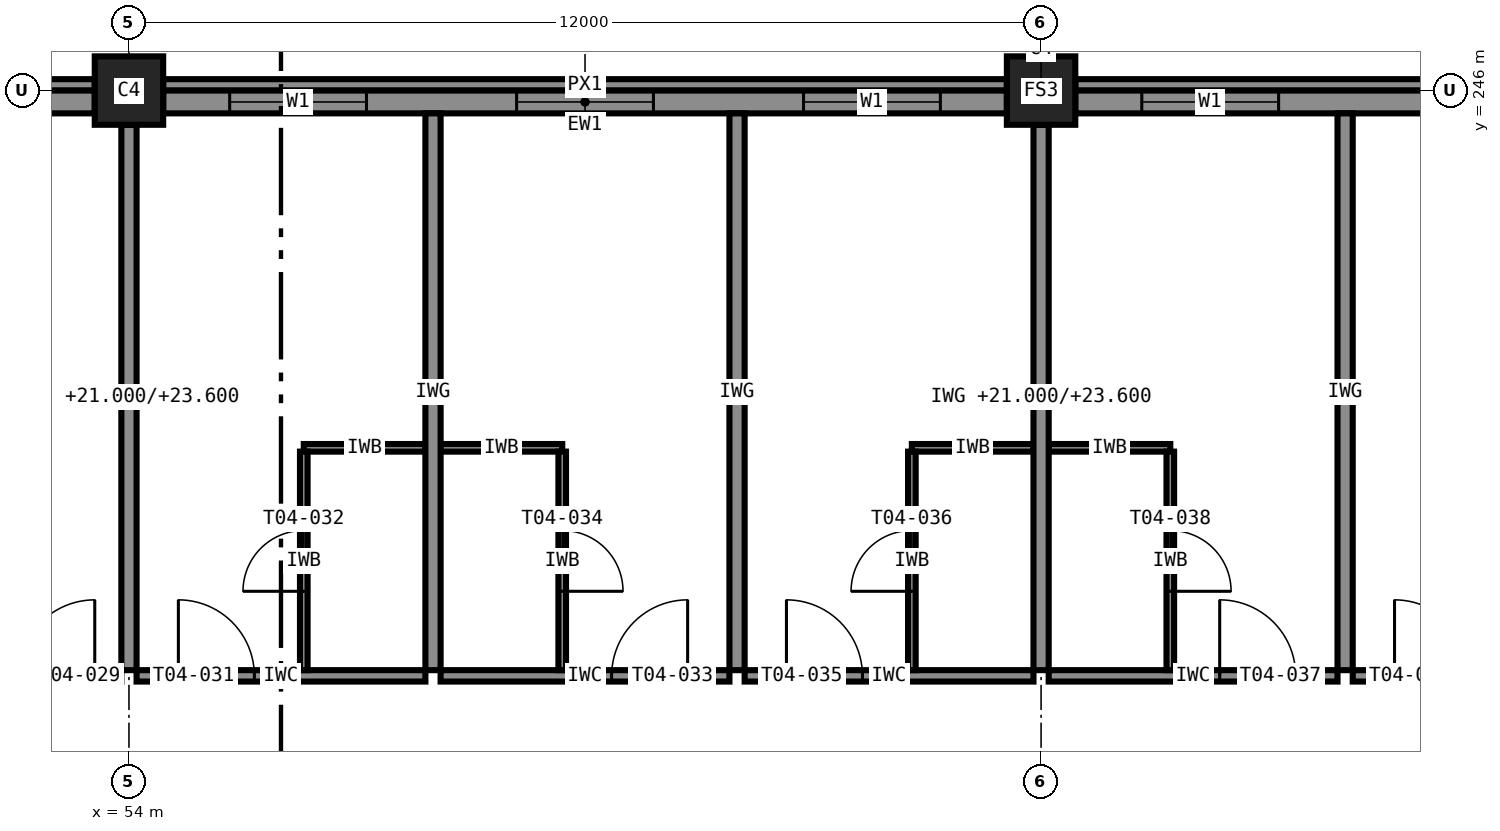
"""IFC4 building model, lengths in metres.
Left out: names, types, materials, properties, quantities, classifications, styles, units other than length and angle.
Written with IfcOpenShell. Run it as: python <this file> out.ifc"""

import sys

from ifc_helpers import new_model, si_unit, direction, frame, frame_2d, origin, origin_2d, place, context, subcontext, project, spatial, rectangle, extrude, element, fill, save


model = new_model("IFC4")
c1 = context("Model", 3, precision=1e-05, world=origin(), true_north=direction((0.0, 1.0)))
c2 = subcontext(c1, "Body", "Model", "MODEL_VIEW")
j1 = project(units=[si_unit("LENGTHUNIT", "METRE"), si_unit("PLANEANGLEUNIT", "RADIAN")], contexts=[c1])
p1 = place(None, origin())
s1 = spatial("IfcSite", under=j1, at=p1, CompositionType="ELEMENT")
p2 = place(p1, origin())
s2 = spatial("IfcBuilding", under=s1, at=p2, CompositionType="ELEMENT")
p3 = place(p2, frame((0.0, 0.0, 21.0)))
s3 = spatial("IfcBuildingStorey", under=s2, at=p3, CompositionType="ELEMENT", Elevation=21.0)
for number, where, z_axis, x_axis in (
    (1, (54.0, 246.0, 0.0), (0.0, 0.0, 1.0), (1.0, 0.0, 0.0)),
    (2, (66.0, 246.0, 0.0), (0.0, 0.0, 1.0), (1.0, 0.0, 0.0)),
):
    element("IfcColumn", number, at=place(p3, frame(where, z_axis=z_axis, x_axis=x_axis)), inside=s3, PredefinedType="COLUMN", context=c2, shape_type="SweptSolid", body=[
        extrude(rectangle(XDim=0.9, YDim=0.9, at=origin_2d()), origin(), (0.0, 0.0, 1.0), 3.6),
    ])
p4 = place(p3, frame((77.55, 245.85, 0.0), z_axis=(0.0, 0.0, 1.0), x_axis=(-1.0, 0.0, 0.0)))
e3 = element("IfcWall", 3, at=p4, inside=s3, PredefinedType="STANDARD", context=c2, shape_type="SweptSolid", body=[
    extrude(rectangle(XDim=11.1, YDim=0.3, at=frame_2d((5.55, 0.0))), origin(), (0.0, 0.0, 1.0), 2.6),
])
p5 = place(p4, frame((8.425, 0.0, 0.85)))
e4 = element("IfcOpeningElement", 4, at=p5, cuts=e3, PredefinedType="OPENING", context=c2, shape_type="SweptSolid", body=[
    extrude(rectangle(XDim=1.8, YDim=1.75, at=frame_2d((0.9, 0.875))), frame((0.0, 0.16, 0.0), z_axis=(0.0, -1.0, 0.0), x_axis=(1.0, 0.0, 0.0)), (0.0, 0.0, 1.0), 0.32),
])
p6 = place(p4, frame((4.65, 0.0, 0.85)))
e5 = element("IfcOpeningElement", 5, at=p6, cuts=e3, PredefinedType="OPENING", context=c2, shape_type="SweptSolid", body=[
    extrude(rectangle(XDim=1.8, YDim=1.75, at=frame_2d((0.9, 0.875))), frame((0.0, 0.16, 0.0), z_axis=(0.0, -1.0, 0.0), x_axis=(1.0, 0.0, 0.0)), (0.0, 0.0, 1.0), 0.32),
])
p7 = place(p4, frame((0.875, 0.0, 0.85)))
e6 = element("IfcOpeningElement", 6, at=p7, cuts=e3, PredefinedType="OPENING", context=c2, shape_type="SweptSolid", body=[
    extrude(rectangle(XDim=1.8, YDim=1.75, at=frame_2d((0.9, 0.875))), frame((0.0, 0.16, 0.0), z_axis=(0.0, -1.0, 0.0), x_axis=(1.0, 0.0, 0.0)), (0.0, 0.0, 1.0), 0.32),
])
p8 = place(p3, frame((65.55, 245.85, 0.0), z_axis=(0.0, 0.0, 1.0), x_axis=(-1.0, 0.0, 0.0)))
e7 = element("IfcWall", 7, at=p8, inside=s3, PredefinedType="STANDARD", context=c2, shape_type="SweptSolid", body=[
    extrude(rectangle(XDim=11.1, YDim=0.3, at=frame_2d((5.55, 0.0))), origin(), (0.0, 0.0, 1.0), 2.6),
])
p9 = place(p8, frame((8.425, 0.0, 0.85)))
e8 = element("IfcOpeningElement", 8, at=p9, cuts=e7, PredefinedType="OPENING", context=c2, shape_type="SweptSolid", body=[
    extrude(rectangle(XDim=1.8, YDim=1.75, at=frame_2d((0.9, 0.875))), frame((0.0, 0.16, 0.0), z_axis=(0.0, -1.0, 0.0), x_axis=(1.0, 0.0, 0.0)), (0.0, 0.0, 1.0), 0.32),
])
p10 = place(p8, frame((4.65, 0.0, 0.85)))
e9 = element("IfcOpeningElement", 9, at=p10, cuts=e7, PredefinedType="OPENING", context=c2, shape_type="SweptSolid", body=[
    extrude(rectangle(XDim=1.8, YDim=1.75, at=frame_2d((0.9, 0.875))), frame((0.0, 0.16, 0.0), z_axis=(0.0, -1.0, 0.0), x_axis=(1.0, 0.0, 0.0)), (0.0, 0.0, 1.0), 0.32),
])
p11 = place(p8, frame((0.875, 0.0, 0.85)))
e10 = element("IfcOpeningElement", 10, at=p11, cuts=e7, PredefinedType="OPENING", context=c2, shape_type="SweptSolid", body=[
    extrude(rectangle(XDim=1.8, YDim=1.75, at=frame_2d((0.9, 0.875))), frame((0.0, 0.16, 0.0), z_axis=(0.0, -1.0, 0.0), x_axis=(1.0, 0.0, 0.0)), (0.0, 0.0, 1.0), 0.32),
])
p12 = place(p3, frame((53.55, 245.85, 0.0), z_axis=(0.0, 0.0, 1.0), x_axis=(-1.0, 0.0, 0.0)))
e11 = element("IfcWall", 11, at=p12, inside=s3, PredefinedType="STANDARD", context=c2, shape_type="SweptSolid", body=[
    extrude(rectangle(XDim=11.1, YDim=0.3, at=frame_2d((5.55, 0.0))), origin(), (0.0, 0.0, 1.0), 2.6),
])
p13 = place(p12, frame((4.45, 0.0, 0.85)))
e12 = element("IfcOpeningElement", 12, at=p13, cuts=e11, PredefinedType="OPENING", context=c2, shape_type="SweptSolid", body=[
    extrude(rectangle(XDim=1.8, YDim=1.75, at=frame_2d((0.9, 0.875))), frame((0.0, 0.16, 0.0), z_axis=(0.0, -1.0, 0.0), x_axis=(1.0, 0.0, 0.0)), (0.0, 0.0, 1.0), 0.32),
])
p14 = place(p12, frame((0.675, 0.0, 0.85)))
e13 = element("IfcOpeningElement", 13, at=p14, cuts=e11, PredefinedType="OPENING", context=c2, shape_type="SweptSolid", body=[
    extrude(rectangle(XDim=1.8, YDim=1.75, at=frame_2d((0.9, 0.875))), frame((0.0, 0.16, 0.0), z_axis=(0.0, -1.0, 0.0), x_axis=(1.0, 0.0, 0.0)), (0.0, 0.0, 1.0), 0.32),
])
for number, where, z_axis, x_axis in (
    (14, (77.55, 246.075, 3.4), (0.0, 0.0, 1.0), (-1.0, 0.0, 0.0)),
    (15, (65.55, 246.075, 3.4), (0.0, 0.0, 1.0), (-1.0, 0.0, 0.0)),
    (16, (53.55, 246.075, 3.4), (0.0, 0.0, 1.0), (-1.0, 0.0, 0.0)),
):
    element("IfcWall", number, at=place(p3, frame(where, z_axis=z_axis, x_axis=x_axis)), inside=s3, PredefinedType="STANDARD", context=c2, shape_type="SweptSolid", body=[
        extrude(rectangle(XDim=11.1, YDim=0.15, at=frame_2d((5.55, 0.0))), origin(), (0.0, 0.0, 1.0), 0.2),
    ])
p15 = place(p3, frame((50.5, 238.3, 0.0), z_axis=(0.0, 0.0, 1.0), x_axis=(1.0, 0.0, 0.0)))
e17 = element("IfcWall", 17, at=p15, inside=s3, PredefinedType="PARTITIONING", context=c2, shape_type="SweptSolid", body=[
    extrude(rectangle(XDim=3.4, YDim=0.15, at=frame_2d((1.7, 0.0))), origin(), (0.0, 0.0, 1.0), 3.4),
])
p16 = place(p15, frame((2.05, 0.0, 0.0)))
e18 = element("IfcOpeningElement", 18, at=p16, cuts=e17, PredefinedType="OPENING", context=c2, shape_type="SweptSolid", body=[
    extrude(rectangle(XDim=1.0, YDim=2.1, at=frame_2d((0.5, 1.05))), frame((0.0, 0.085, 0.0), z_axis=(0.0, -1.0, 0.0), x_axis=(1.0, 0.0, 0.0)), (0.0, 0.0, 1.0), 0.17),
])
p17 = place(p3, frame((54.1, 238.3, 0.0), z_axis=(0.0, 0.0, 1.0), x_axis=(1.0, 0.0, 0.0)))
e19 = element("IfcWall", 19, at=p17, inside=s3, PredefinedType="PARTITIONING", context=c2, shape_type="SweptSolid", body=[
    extrude(rectangle(XDim=3.8, YDim=0.15, at=frame_2d((1.9, 0.0))), origin(), (0.0, 0.0, 1.0), 3.4),
])
p18 = place(p17, frame((0.55, 0.0, 0.0)))
e20 = element("IfcOpeningElement", 20, at=p18, cuts=e19, PredefinedType="OPENING", context=c2, shape_type="SweptSolid", body=[
    extrude(rectangle(XDim=1.0, YDim=2.1, at=frame_2d((0.5, 1.05))), frame((0.0, 0.085, 0.0), z_axis=(0.0, -1.0, 0.0), x_axis=(1.0, 0.0, 0.0)), (0.0, 0.0, 1.0), 0.17),
])
p19 = place(p3, frame((56.3, 241.3, 0.0), z_axis=(0.0, 0.0, 1.0), x_axis=(1.0, 0.0, 0.0)))
e21 = element("IfcWall", 21, at=p19, inside=s3, PredefinedType="PARTITIONING", context=c2, shape_type="SweptSolid", body=[
    extrude(rectangle(XDim=1.6, YDim=0.1, at=frame_2d((0.8, 0.0))), origin(), (0.0, 0.0, 1.0), 3.4),
])
p20 = place(p3, frame((56.3, 238.375, 0.0), z_axis=(0.0, 0.0, 1.0), x_axis=(0.0, 1.0, 0.0)))
e22 = element("IfcWall", 22, at=p20, inside=s3, PredefinedType="PARTITIONING", context=c2, shape_type="SweptSolid", body=[
    extrude(rectangle(XDim=2.875, YDim=0.1, at=frame_2d((1.438, 0.0))), origin(), (0.0, 0.0, 1.0), 3.4),
])
p21 = place(p20, frame((1.038, 0.0, 0.0)))
e23 = element("IfcOpeningElement", 23, at=p21, cuts=e22, PredefinedType="OPENING", context=c2, shape_type="SweptSolid", body=[
    extrude(rectangle(XDim=0.8, YDim=2.1, at=frame_2d((0.4, 1.05))), frame((0.0, 0.06, 0.0), z_axis=(0.0, -1.0, 0.0), x_axis=(1.0, 0.0, 0.0)), (0.0, 0.0, 1.0), 0.12),
])
p22 = place(p3, frame((58.1, 238.3, 0.0), z_axis=(0.0, 0.0, 1.0), x_axis=(1.0, 0.0, 0.0)))
e24 = element("IfcWall", 24, at=p22, inside=s3, PredefinedType="PARTITIONING", context=c2, shape_type="SweptSolid", body=[
    extrude(rectangle(XDim=3.8, YDim=0.15, at=frame_2d((1.9, 0.0))), origin(), (0.0, 0.0, 1.0), 3.4),
])
p23 = place(p22, frame((2.25, 0.0, 0.0)))
e25 = element("IfcOpeningElement", 25, at=p23, cuts=e24, PredefinedType="OPENING", context=c2, shape_type="SweptSolid", body=[
    extrude(rectangle(XDim=1.0, YDim=2.1, at=frame_2d((0.5, 1.05))), frame((0.0, 0.085, 0.0), z_axis=(0.0, -1.0, 0.0), x_axis=(1.0, 0.0, 0.0)), (0.0, 0.0, 1.0), 0.17),
])
p24 = place(p3, frame((58.1, 241.3, 0.0), z_axis=(0.0, 0.0, 1.0), x_axis=(1.0, 0.0, 0.0)))
e26 = element("IfcWall", 26, at=p24, inside=s3, PredefinedType="PARTITIONING", context=c2, shape_type="SweptSolid", body=[
    extrude(rectangle(XDim=1.6, YDim=0.1, at=frame_2d((0.8, 0.0))), origin(), (0.0, 0.0, 1.0), 3.4),
])
p25 = place(p3, frame((59.7, 241.25, 0.0), z_axis=(0.0, 0.0, 1.0), x_axis=(0.0, -1.0, 0.0)))
e27 = element("IfcWall", 27, at=p25, inside=s3, PredefinedType="PARTITIONING", context=c2, shape_type="SweptSolid", body=[
    extrude(rectangle(XDim=2.875, YDim=0.1, at=frame_2d((1.438, 0.0))), origin(), (0.0, 0.0, 1.0), 3.4),
])
p26 = place(p25, frame((1.038, 0.0, 0.0)))
e28 = element("IfcOpeningElement", 28, at=p26, cuts=e27, PredefinedType="OPENING", context=c2, shape_type="SweptSolid", body=[
    extrude(rectangle(XDim=0.8, YDim=2.1, at=frame_2d((0.4, 1.05))), frame((0.0, 0.06, 0.0), z_axis=(0.0, -1.0, 0.0), x_axis=(1.0, 0.0, 0.0)), (0.0, 0.0, 1.0), 0.12),
])
p27 = place(p3, frame((62.1, 238.3, 0.0), z_axis=(0.0, 0.0, 1.0), x_axis=(1.0, 0.0, 0.0)))
e29 = element("IfcWall", 29, at=p27, inside=s3, PredefinedType="PARTITIONING", context=c2, shape_type="SweptSolid", body=[
    extrude(rectangle(XDim=3.8, YDim=0.15, at=frame_2d((1.9, 0.0))), origin(), (0.0, 0.0, 1.0), 3.4),
])
p28 = place(p27, frame((0.55, 0.0, 0.0)))
e30 = element("IfcOpeningElement", 30, at=p28, cuts=e29, PredefinedType="OPENING", context=c2, shape_type="SweptSolid", body=[
    extrude(rectangle(XDim=1.0, YDim=2.1, at=frame_2d((0.5, 1.05))), frame((0.0, 0.085, 0.0), z_axis=(0.0, -1.0, 0.0), x_axis=(1.0, 0.0, 0.0)), (0.0, 0.0, 1.0), 0.17),
])
p29 = place(p3, frame((64.3, 241.3, 0.0), z_axis=(0.0, 0.0, 1.0), x_axis=(1.0, 0.0, 0.0)))
e31 = element("IfcWall", 31, at=p29, inside=s3, PredefinedType="PARTITIONING", context=c2, shape_type="SweptSolid", body=[
    extrude(rectangle(XDim=1.6, YDim=0.1, at=frame_2d((0.8, 0.0))), origin(), (0.0, 0.0, 1.0), 3.4),
])
p30 = place(p3, frame((64.3, 238.375, 0.0), z_axis=(0.0, 0.0, 1.0), x_axis=(0.0, 1.0, 0.0)))
e32 = element("IfcWall", 32, at=p30, inside=s3, PredefinedType="PARTITIONING", context=c2, shape_type="SweptSolid", body=[
    extrude(rectangle(XDim=2.875, YDim=0.1, at=frame_2d((1.438, 0.0))), origin(), (0.0, 0.0, 1.0), 3.4),
])
p31 = place(p30, frame((1.038, 0.0, 0.0)))
e33 = element("IfcOpeningElement", 33, at=p31, cuts=e32, PredefinedType="OPENING", context=c2, shape_type="SweptSolid", body=[
    extrude(rectangle(XDim=0.8, YDim=2.1, at=frame_2d((0.4, 1.05))), frame((0.0, 0.06, 0.0), z_axis=(0.0, -1.0, 0.0), x_axis=(1.0, 0.0, 0.0)), (0.0, 0.0, 1.0), 0.12),
])
p32 = place(p3, frame((66.1, 238.3, 0.0), z_axis=(0.0, 0.0, 1.0), x_axis=(1.0, 0.0, 0.0)))
e34 = element("IfcWall", 34, at=p32, inside=s3, PredefinedType="PARTITIONING", context=c2, shape_type="SweptSolid", body=[
    extrude(rectangle(XDim=3.8, YDim=0.15, at=frame_2d((1.9, 0.0))), origin(), (0.0, 0.0, 1.0), 3.4),
])
p33 = place(p32, frame((2.25, 0.0, 0.0)))
e35 = element("IfcOpeningElement", 35, at=p33, cuts=e34, PredefinedType="OPENING", context=c2, shape_type="SweptSolid", body=[
    extrude(rectangle(XDim=1.0, YDim=2.1, at=frame_2d((0.5, 1.05))), frame((0.0, 0.085, 0.0), z_axis=(0.0, -1.0, 0.0), x_axis=(1.0, 0.0, 0.0)), (0.0, 0.0, 1.0), 0.17),
])
p34 = place(p3, frame((66.1, 241.3, 0.0), z_axis=(0.0, 0.0, 1.0), x_axis=(1.0, 0.0, 0.0)))
e36 = element("IfcWall", 36, at=p34, inside=s3, PredefinedType="PARTITIONING", context=c2, shape_type="SweptSolid", body=[
    extrude(rectangle(XDim=1.6, YDim=0.1, at=frame_2d((0.8, 0.0))), origin(), (0.0, 0.0, 1.0), 3.4),
])
p35 = place(p3, frame((67.7, 241.25, 0.0), z_axis=(0.0, 0.0, 1.0), x_axis=(0.0, -1.0, 0.0)))
e37 = element("IfcWall", 37, at=p35, inside=s3, PredefinedType="PARTITIONING", context=c2, shape_type="SweptSolid", body=[
    extrude(rectangle(XDim=2.875, YDim=0.1, at=frame_2d((1.438, 0.0))), origin(), (0.0, 0.0, 1.0), 3.4),
])
p36 = place(p35, frame((1.038, 0.0, 0.0)))
e38 = element("IfcOpeningElement", 38, at=p36, cuts=e37, PredefinedType="OPENING", context=c2, shape_type="SweptSolid", body=[
    extrude(rectangle(XDim=0.8, YDim=2.1, at=frame_2d((0.4, 1.05))), frame((0.0, 0.06, 0.0), z_axis=(0.0, -1.0, 0.0), x_axis=(1.0, 0.0, 0.0)), (0.0, 0.0, 1.0), 0.12),
])
p37 = place(p3, frame((70.1, 238.3, 0.0), z_axis=(0.0, 0.0, 1.0), x_axis=(1.0, 0.0, 0.0)))
e39 = element("IfcWall", 39, at=p37, inside=s3, PredefinedType="PARTITIONING", context=c2, shape_type="SweptSolid", body=[
    extrude(rectangle(XDim=3.8, YDim=0.15, at=frame_2d((1.9, 0.0))), origin(), (0.0, 0.0, 1.0), 3.4),
])
p38 = place(p37, frame((0.55, 0.0, 0.0)))
e40 = element("IfcOpeningElement", 40, at=p38, cuts=e39, PredefinedType="OPENING", context=c2, shape_type="SweptSolid", body=[
    extrude(rectangle(XDim=1.0, YDim=2.1, at=frame_2d((0.5, 1.05))), frame((0.0, 0.085, 0.0), z_axis=(0.0, -1.0, 0.0), x_axis=(1.0, 0.0, 0.0)), (0.0, 0.0, 1.0), 0.17),
])
p39 = place(p3, frame((54.0, 245.55, 0.0), z_axis=(0.0, 0.0, 1.0), x_axis=(0.0, -1.0, 0.0)))
e41 = element("IfcWall", 41, at=p39, inside=s3, PredefinedType="PARTITIONING", context=c2, shape_type="SweptSolid", body=[
    extrude(rectangle(XDim=7.175, YDim=0.2, at=frame_2d((3.587, 0.0))), origin(), (0.0, 0.0, 1.0), 2.6),
])
for number, where, z_axis, x_axis in (
    (42, (58.0, 245.7, 0.0), (0.0, 0.0, 1.0), (0.0, -1.0, 0.0)),
    (43, (62.0, 245.7, 0.0), (0.0, 0.0, 1.0), (0.0, -1.0, 0.0)),
):
    element("IfcWall", number, at=place(p3, frame(where, z_axis=z_axis, x_axis=x_axis)), inside=s3, PredefinedType="PARTITIONING", context=c2, shape_type="SweptSolid", body=[
        extrude(rectangle(XDim=7.325, YDim=0.2, at=frame_2d((3.663, 0.0))), origin(), (0.0, 0.0, 1.0), 3.4),
    ])
p40 = place(p3, frame((66.0, 245.55, 0.0), z_axis=(0.0, 0.0, 1.0), x_axis=(0.0, -1.0, 0.0)))
e44 = element("IfcWall", 44, at=p40, inside=s3, PredefinedType="PARTITIONING", context=c2, shape_type="SweptSolid", body=[
    extrude(rectangle(XDim=7.175, YDim=0.2, at=frame_2d((3.587, 0.0))), origin(), (0.0, 0.0, 1.0), 2.6),
])
p41 = place(p3, frame((70.0, 245.7, 0.0), z_axis=(0.0, 0.0, 1.0), x_axis=(0.0, -1.0, 0.0)))
e45 = element("IfcWall", 45, at=p41, inside=s3, PredefinedType="PARTITIONING", context=c2, shape_type="SweptSolid", body=[
    extrude(rectangle(XDim=7.325, YDim=0.2, at=frame_2d((3.663, 0.0))), origin(), (0.0, 0.0, 1.0), 3.4),
])
p42 = place(p5, origin())
e46 = element("IfcWindow", 46, at=p42, inside=s3, PartitioningType="SINGLE_PANEL", PredefinedType="WINDOW", context=c2, shape_type="SweptSolid", body=[
    extrude(rectangle(XDim=1.8, YDim=1.75, at=frame_2d((0.9, 0.875))), frame((0.0, 0.03, 0.0), z_axis=(0.0, -1.0, 0.0), x_axis=(1.0, 0.0, 0.0)), (0.0, 0.0, 1.0), 0.06),
])
fill(e4, e46)
p43 = place(p9, origin())
e47 = element("IfcWindow", 47, at=p43, inside=s3, PartitioningType="SINGLE_PANEL", PredefinedType="WINDOW", context=c2, shape_type="SweptSolid", body=[
    extrude(rectangle(XDim=1.8, YDim=1.75, at=frame_2d((0.9, 0.875))), frame((0.0, 0.03, 0.0), z_axis=(0.0, -1.0, 0.0), x_axis=(1.0, 0.0, 0.0)), (0.0, 0.0, 1.0), 0.06),
])
fill(e8, e47)
p44 = place(p10, origin())
e48 = element("IfcWindow", 48, at=p44, inside=s3, PartitioningType="SINGLE_PANEL", PredefinedType="WINDOW", context=c2, shape_type="SweptSolid", body=[
    extrude(rectangle(XDim=1.8, YDim=1.75, at=frame_2d((0.9, 0.875))), frame((0.0, 0.03, 0.0), z_axis=(0.0, -1.0, 0.0), x_axis=(1.0, 0.0, 0.0)), (0.0, 0.0, 1.0), 0.06),
])
fill(e9, e48)
p45 = place(p11, origin())
e49 = element("IfcWindow", 49, at=p45, inside=s3, PartitioningType="SINGLE_PANEL", PredefinedType="WINDOW", context=c2, shape_type="SweptSolid", body=[
    extrude(rectangle(XDim=1.8, YDim=1.75, at=frame_2d((0.9, 0.875))), frame((0.0, 0.03, 0.0), z_axis=(0.0, -1.0, 0.0), x_axis=(1.0, 0.0, 0.0)), (0.0, 0.0, 1.0), 0.06),
])
fill(e10, e49)
p46 = place(p16, origin())
e50 = element("IfcDoor", 50, at=p46, inside=s3, OperationType="SINGLE_SWING_RIGHT", PredefinedType="DOOR", context=c2, shape_type="SweptSolid", body=[
    extrude(rectangle(XDim=1.0, YDim=2.1, at=frame_2d((0.5, 1.05))), frame((0.0, 0.025, 0.0), z_axis=(0.0, -1.0, 0.0), x_axis=(1.0, 0.0, 0.0)), (0.0, 0.0, 1.0), 0.05),
])
fill(e18, e50)
p47 = place(p18, origin())
e51 = element("IfcDoor", 51, at=p47, inside=s3, OperationType="SINGLE_SWING_LEFT", PredefinedType="DOOR", context=c2, shape_type="SweptSolid", body=[
    extrude(rectangle(XDim=1.0, YDim=2.1, at=frame_2d((0.5, 1.05))), frame((0.0, 0.025, 0.0), z_axis=(0.0, -1.0, 0.0), x_axis=(1.0, 0.0, 0.0)), (0.0, 0.0, 1.0), 0.05),
])
fill(e20, e51)
p48 = place(p21, origin())
e52 = element("IfcDoor", 52, at=p48, inside=s3, OperationType="SINGLE_SWING_LEFT", PredefinedType="DOOR", context=c2, shape_type="SweptSolid", body=[
    extrude(rectangle(XDim=0.8, YDim=2.1, at=frame_2d((0.4, 1.05))), frame((0.0, 0.025, 0.0), z_axis=(0.0, -1.0, 0.0), x_axis=(1.0, 0.0, 0.0)), (0.0, 0.0, 1.0), 0.05),
])
fill(e23, e52)
p49 = place(p23, origin())
e53 = element("IfcDoor", 53, at=p49, inside=s3, OperationType="SINGLE_SWING_RIGHT", PredefinedType="DOOR", context=c2, shape_type="SweptSolid", body=[
    extrude(rectangle(XDim=1.0, YDim=2.1, at=frame_2d((0.5, 1.05))), frame((0.0, 0.025, 0.0), z_axis=(0.0, -1.0, 0.0), x_axis=(1.0, 0.0, 0.0)), (0.0, 0.0, 1.0), 0.05),
])
fill(e25, e53)
p50 = place(p26, origin())
e54 = element("IfcDoor", 54, at=p50, inside=s3, OperationType="SINGLE_SWING_RIGHT", PredefinedType="DOOR", context=c2, shape_type="SweptSolid", body=[
    extrude(rectangle(XDim=0.8, YDim=2.1, at=frame_2d((0.4, 1.05))), frame((0.0, 0.025, 0.0), z_axis=(0.0, -1.0, 0.0), x_axis=(1.0, 0.0, 0.0)), (0.0, 0.0, 1.0), 0.05),
])
fill(e28, e54)
p51 = place(p28, origin())
e55 = element("IfcDoor", 55, at=p51, inside=s3, OperationType="SINGLE_SWING_LEFT", PredefinedType="DOOR", context=c2, shape_type="SweptSolid", body=[
    extrude(rectangle(XDim=1.0, YDim=2.1, at=frame_2d((0.5, 1.05))), frame((0.0, 0.025, 0.0), z_axis=(0.0, -1.0, 0.0), x_axis=(1.0, 0.0, 0.0)), (0.0, 0.0, 1.0), 0.05),
])
fill(e30, e55)
p52 = place(p31, origin())
e56 = element("IfcDoor", 56, at=p52, inside=s3, OperationType="SINGLE_SWING_LEFT", PredefinedType="DOOR", context=c2, shape_type="SweptSolid", body=[
    extrude(rectangle(XDim=0.8, YDim=2.1, at=frame_2d((0.4, 1.05))), frame((0.0, 0.025, 0.0), z_axis=(0.0, -1.0, 0.0), x_axis=(1.0, 0.0, 0.0)), (0.0, 0.0, 1.0), 0.05),
])
fill(e33, e56)
p53 = place(p33, origin())
e57 = element("IfcDoor", 57, at=p53, inside=s3, OperationType="SINGLE_SWING_LEFT", PredefinedType="DOOR", context=c2, shape_type="SweptSolid", body=[
    extrude(rectangle(XDim=1.0, YDim=2.1, at=frame_2d((0.5, 1.05))), frame((0.0, 0.025, 0.0), z_axis=(0.0, -1.0, 0.0), x_axis=(1.0, 0.0, 0.0)), (0.0, 0.0, 1.0), 0.05),
])
fill(e35, e57)
p54 = place(p36, origin())
e58 = element("IfcDoor", 58, at=p54, inside=s3, OperationType="SINGLE_SWING_RIGHT", PredefinedType="DOOR", context=c2, shape_type="SweptSolid", body=[
    extrude(rectangle(XDim=0.8, YDim=2.1, at=frame_2d((0.4, 1.05))), frame((0.0, 0.025, 0.0), z_axis=(0.0, -1.0, 0.0), x_axis=(1.0, 0.0, 0.0)), (0.0, 0.0, 1.0), 0.05),
])
fill(e38, e58)
p55 = place(p38, origin())
e59 = element("IfcDoor", 59, at=p55, inside=s3, OperationType="SINGLE_SWING_LEFT", PredefinedType="DOOR", context=c2, shape_type="SweptSolid", body=[
    extrude(rectangle(XDim=1.0, YDim=2.1, at=frame_2d((0.5, 1.05))), frame((0.0, 0.025, 0.0), z_axis=(0.0, -1.0, 0.0), x_axis=(1.0, 0.0, 0.0)), (0.0, 0.0, 1.0), 0.05),
])
fill(e40, e59)
save(model, sys.argv[1])
